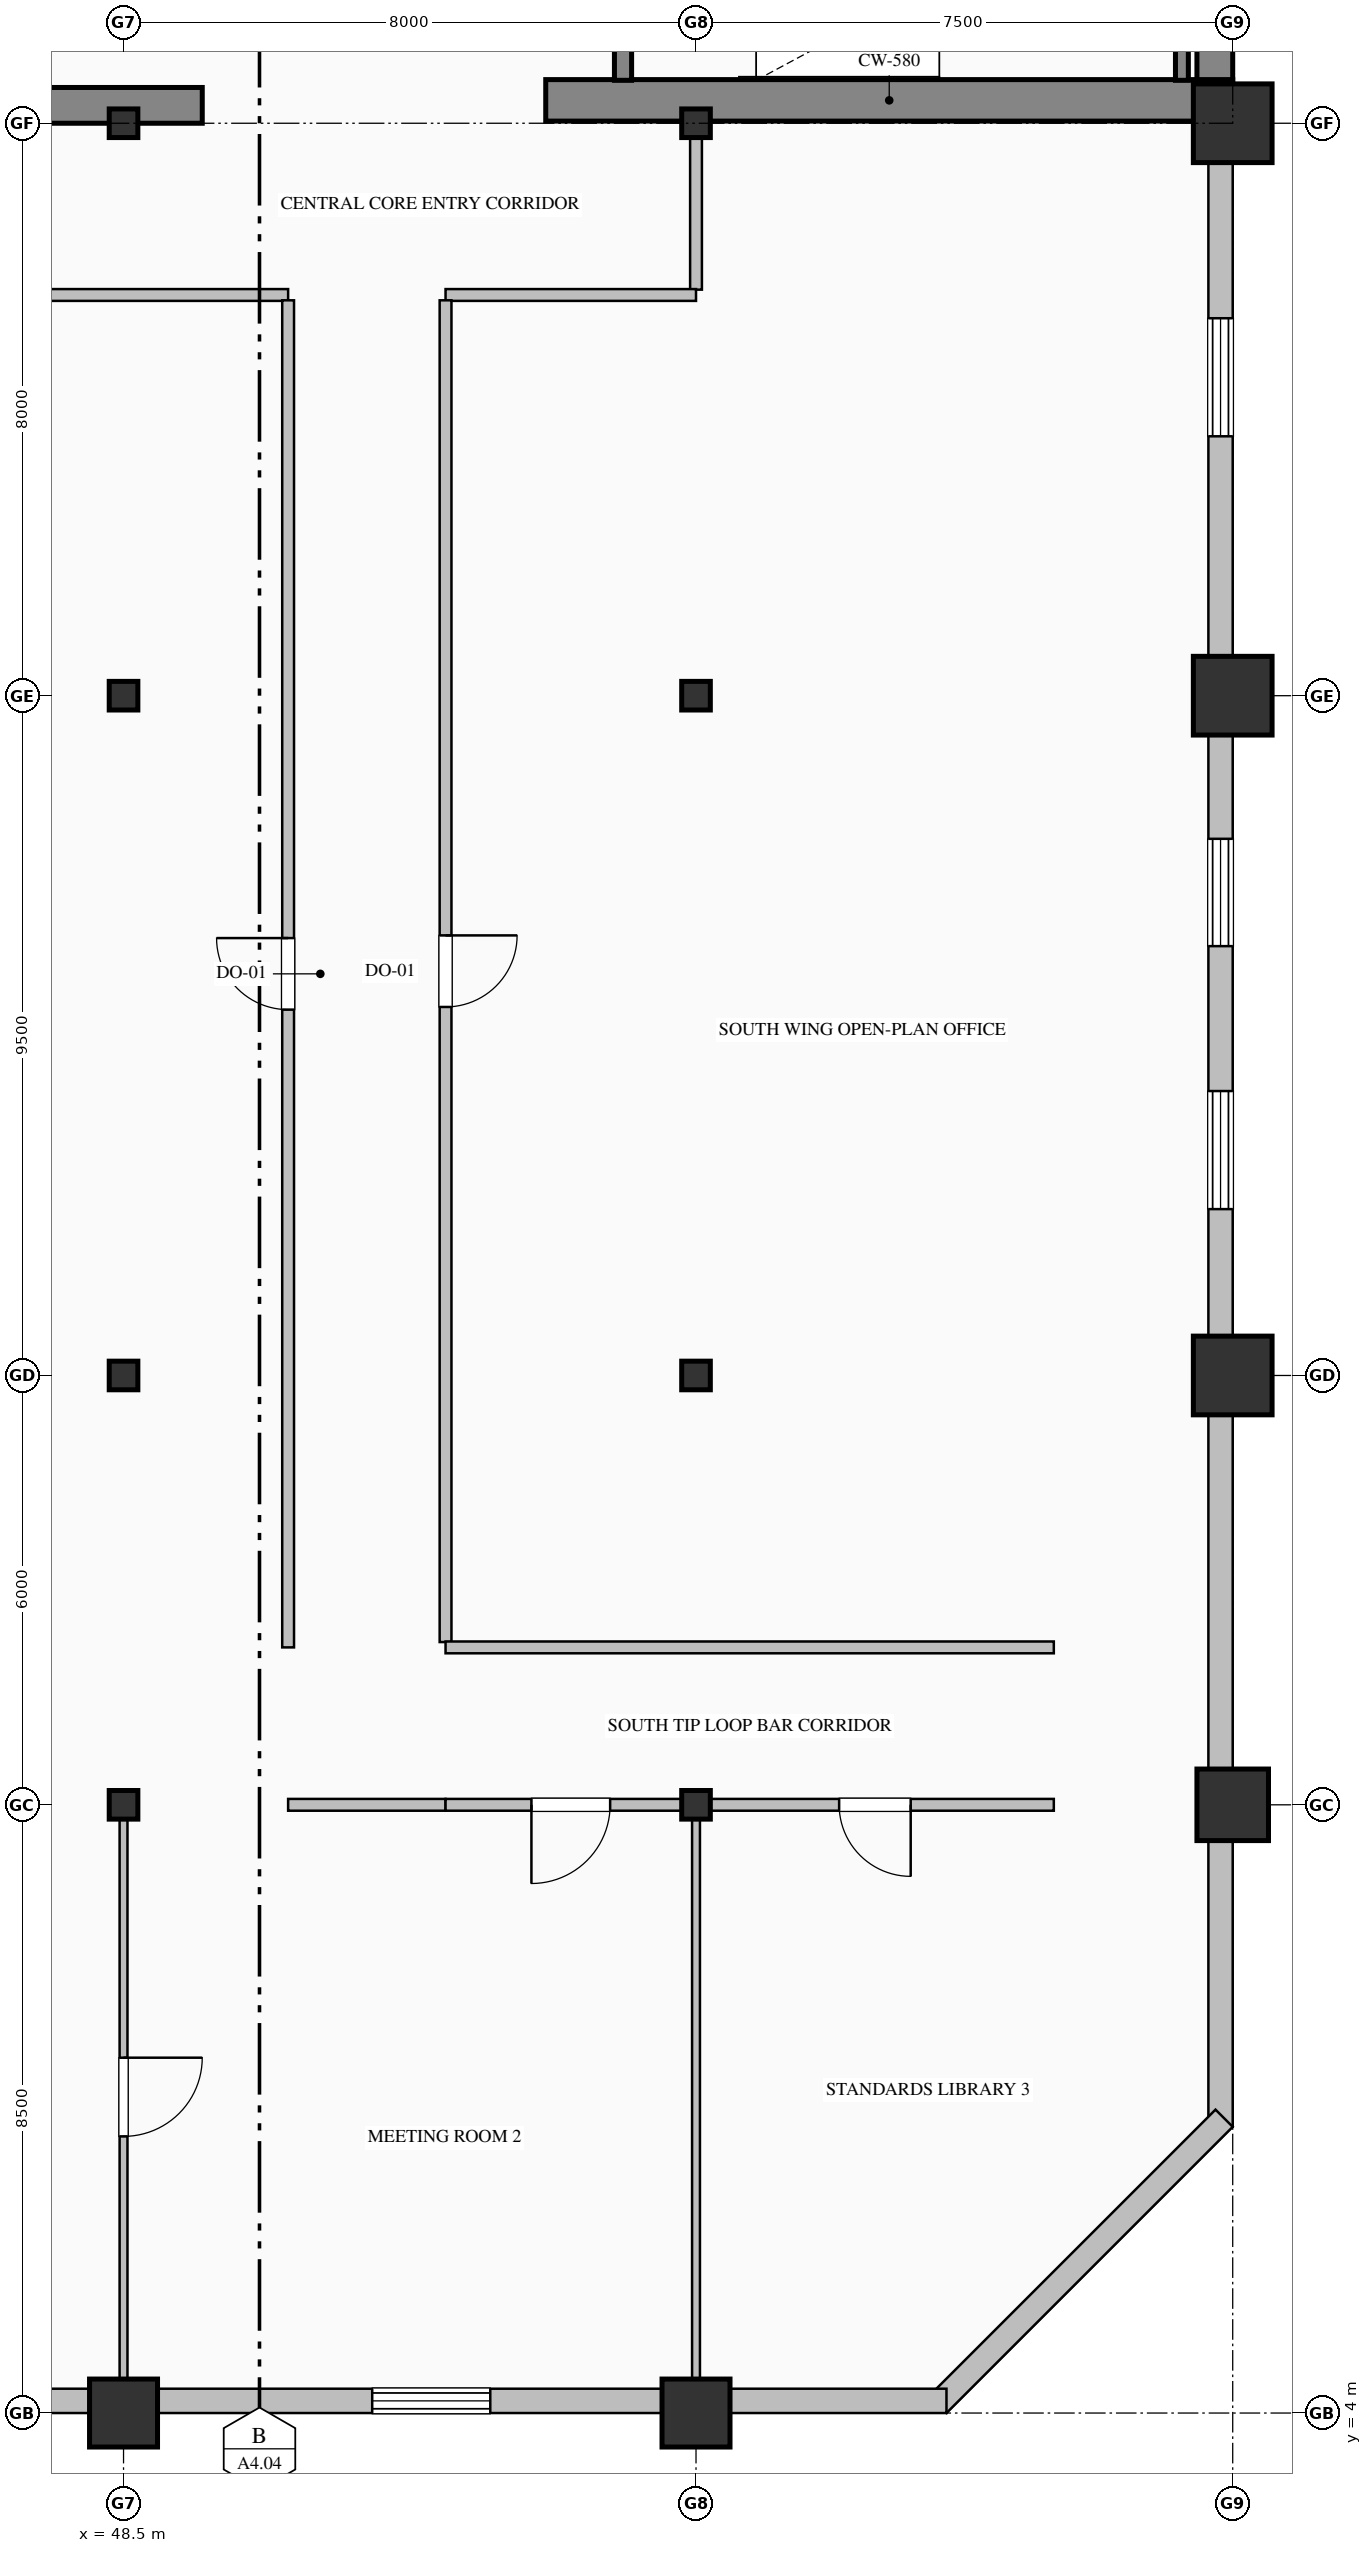
"""IFC4 building model, lengths in metres.
Left out: names, types, materials, properties, quantities, classifications, styles, units other than length and angle.
Written with IfcOpenShell. Run it as: python <this file> out.ifc"""

import sys

from ifc_helpers import new_model, si_unit, direction, frame, frame_2d, origin, origin_2d, place, context, subcontext, project, spatial, rectangle, hollow_rectangle, hollow_circle, i_section, extrude, element, fill, save


model = new_model("IFC4")
c1 = context("Model", 3, precision=1e-05, world=origin(), true_north=direction((0.0, 1.0)))
c2 = subcontext(c1, "Body", "Model", "MODEL_VIEW")
j1 = project(units=[si_unit("LENGTHUNIT", "METRE"), si_unit("PLANEANGLEUNIT", "RADIAN")], contexts=[c1])
p1 = place(None, origin())
s1 = spatial("IfcSite", under=j1, at=p1, CompositionType="ELEMENT")
p2 = place(p1, origin())
s2 = spatial("IfcBuilding", under=s1, at=p2, CompositionType="ELEMENT")
p3 = place(p2, frame((0.0, 0.0, 131.0)))
s3 = spatial("IfcBuildingStorey", under=s2, at=p3, CompositionType="ELEMENT", Elevation=131.0)
p4 = place(p3, frame((63.75, 36.32, 0.0), z_axis=(0.0, 0.0, 1.0), x_axis=(0.0, 1.0, 0.0)))
e1 = element("IfcWall", 1, at=p4, inside=s3, PredefinedType="SHEAR", context=c2, shape_type="SweptSolid", body=[
    extrude(rectangle(XDim=15.18, YDim=0.5, at=frame_2d((7.59, 0.0))), origin(), (0.0, 0.0, 1.0), 3.765),
])
p5 = place(p3, frame((40.5, 36.25, 0.0), z_axis=(0.0, 0.0, 1.0), x_axis=(1.0, 0.0, 0.0)))
e2 = element("IfcWall", 2, at=p5, inside=s3, PredefinedType="SHEAR", context=c2, shape_type="SweptSolid", body=[
    extrude(rectangle(XDim=9.1, YDim=0.5, at=frame_2d((4.55, 0.0))), origin(), (0.0, 0.0, 1.0), 3.765),
])
p6 = place(p3, frame((54.4, 36.32, 0.0), z_axis=(0.0, 0.0, 1.0), x_axis=(1.0, 0.0, 0.0)))
e3 = element("IfcWall", 3, at=p6, inside=s3, PredefinedType="SHEAR", context=c2, shape_type="SweptSolid", body=[
    extrude(rectangle(XDim=9.6, YDim=0.58, at=frame_2d((4.8, 0.0))), origin(), (0.0, 0.0, 1.0), 4.0),
])
p7 = place(p3, frame((48.5, 4.0, 0.0), z_axis=(0.0, 0.0, 1.0), x_axis=(1.0, 0.0, 0.0)))
e4 = element("IfcColumn", 4, at=p7, inside=s3, PredefinedType="COLUMN", context=c2, shape_type="SweptSolid", body=[
    extrude(hollow_rectangle(XDim=0.95, YDim=0.95, WallThickness=0.036, at=origin_2d()), origin(), (0.0, 0.0, 1.0), 4.0),
])
for number, where, z_axis, x_axis in (
    (5, (48.5, 12.5, 0.0), (0.0, 0.0, 1.0), (1.0, 0.0, 0.0)),
    (6, (48.5, 18.5, 0.0), (0.0, 0.0, 1.0), (1.0, 0.0, 0.0)),
    (7, (48.5, 28.0, 0.0), (0.0, 0.0, 1.0), (1.0, 0.0, 0.0)),
    (8, (48.5, 36.0, 0.0), (0.0, 0.0, 1.0), (1.0, 0.0, 0.0)),
):
    element("IfcColumn", number, at=place(p3, frame(where, z_axis=z_axis, x_axis=x_axis)), inside=s3, PredefinedType="COLUMN", context=c2, shape_type="SweptSolid", body=[
        extrude(i_section(OverallWidth=0.4, OverallDepth=0.4, WebThickness=0.013, FlangeThickness=0.021, FilletRadius=0.022, at=origin_2d()), origin(), (0.0, 0.0, 1.0), 4.0),
    ])
p8 = place(p3, frame((56.5, 4.0, 0.0), z_axis=(0.0, 0.0, 1.0), x_axis=(1.0, 0.0, 0.0)))
e9 = element("IfcColumn", 9, at=p8, inside=s3, PredefinedType="COLUMN", context=c2, shape_type="SweptSolid", body=[
    extrude(hollow_rectangle(XDim=0.95, YDim=0.95, WallThickness=0.036, at=origin_2d()), origin(), (0.0, 0.0, 1.0), 4.0),
])
for number, where, z_axis, x_axis in (
    (10, (56.5, 12.5, 0.0), (0.0, 0.0, 1.0), (1.0, 0.0, 0.0)),
    (11, (56.5, 18.5, 0.0), (0.0, 0.0, 1.0), (1.0, 0.0, 0.0)),
    (12, (56.5, 28.0, 0.0), (0.0, 0.0, 1.0), (1.0, 0.0, 0.0)),
    (13, (56.5, 36.0, 0.0), (0.0, 0.0, 1.0), (1.0, 0.0, 0.0)),
):
    element("IfcColumn", number, at=place(p3, frame(where, z_axis=z_axis, x_axis=x_axis)), inside=s3, PredefinedType="COLUMN", context=c2, shape_type="SweptSolid", body=[
        extrude(i_section(OverallWidth=0.4, OverallDepth=0.4, WebThickness=0.013, FlangeThickness=0.021, FilletRadius=0.022, at=origin_2d()), origin(), (0.0, 0.0, 1.0), 4.0),
    ])
p9 = place(p3, frame((64.0, 12.5, 0.0), z_axis=(0.0, 0.0, 1.0), x_axis=(1.0, 0.0, 0.0)))
e14 = element("IfcColumn", 14, at=p9, inside=s3, PredefinedType="COLUMN", context=c2, shape_type="SweptSolid", body=[
    extrude(hollow_circle(Radius=0.5, WallThickness=0.036, at=origin_2d()), origin(), (0.0, 0.0, 1.0), 4.0),
])
for number, where, z_axis, x_axis in (
    (15, (64.0, 18.5, 0.0), (0.0, 0.0, 1.0), (1.0, 0.0, 0.0)),
    (16, (64.0, 28.0, 0.0), (0.0, 0.0, 1.0), (1.0, 0.0, 0.0)),
    (17, (64.0, 36.0, 0.0), (0.0, 0.0, 1.0), (1.0, 0.0, 0.0)),
):
    element("IfcColumn", number, at=place(p3, frame(where, z_axis=z_axis, x_axis=x_axis)), inside=s3, PredefinedType="COLUMN", context=c2, shape_type="SweptSolid", body=[
        extrude(hollow_rectangle(XDim=1.1, YDim=1.1, WallThickness=0.04, at=origin_2d()), origin(), (0.0, 0.0, 1.0), 4.0),
    ])
p10 = place(p3, frame((63.83, 36.05, 0.0), z_axis=(0.0, 0.0, 1.0), x_axis=(0.0, -1.0, 0.0)))
e18 = element("IfcWall", 18, at=p10, inside=s3, PredefinedType="SOLIDWALL", context=c2, shape_type="SweptSolid", body=[
    extrude(rectangle(XDim=28.05, YDim=0.34, at=frame_2d((14.025, 0.0))), origin(), (0.0, 0.0, 1.0), 3.265),
])
p11 = place(p10, frame((2.775, 0.0, 0.85)))
e19 = element("IfcOpeningElement", 19, at=p11, cuts=e18, PredefinedType="OPENING", context=c2, shape_type="SweptSolid", body=[
    extrude(rectangle(XDim=1.65, YDim=1.95, at=frame_2d((0.825, 0.975))), frame((0.0, 0.18, 0.0), z_axis=(0.0, -1.0, 0.0), x_axis=(1.0, 0.0, 0.0)), (0.0, 0.0, 1.0), 0.36),
])
p12 = place(p10, frame((10.05, 0.0, 0.85)))
e20 = element("IfcOpeningElement", 20, at=p12, cuts=e18, PredefinedType="OPENING", context=c2, shape_type="SweptSolid", body=[
    extrude(rectangle(XDim=1.5, YDim=1.95, at=frame_2d((0.75, 0.975))), frame((0.0, 0.18, 0.0), z_axis=(0.0, -1.0, 0.0), x_axis=(1.0, 0.0, 0.0)), (0.0, 0.0, 1.0), 0.36),
])
p13 = place(p10, frame((13.575, 0.0, 0.85)))
e21 = element("IfcOpeningElement", 21, at=p13, cuts=e18, PredefinedType="OPENING", context=c2, shape_type="SweptSolid", body=[
    extrude(rectangle(XDim=1.65, YDim=1.95, at=frame_2d((0.825, 0.975))), frame((0.0, 0.18, 0.0), z_axis=(0.0, -1.0, 0.0), x_axis=(1.0, 0.0, 0.0)), (0.0, 0.0, 1.0), 0.36),
])
p14 = place(p3, frame((63.88, 8.12, 0.0), z_axis=(0.0, 0.0, 1.0), x_axis=(-0.707106781187, -0.707106781187, 0.0)))
e22 = element("IfcWall", 22, at=p14, inside=s3, PredefinedType="SOLIDWALL", context=c2, shape_type="SweptSolid", body=[
    extrude(rectangle(XDim=5.657, YDim=0.34, at=frame_2d((2.828, 0.0))), origin(), (0.0, 0.0, 1.0), 3.765),
])
p15 = place(p3, frame((60.0, 4.17, 0.0), z_axis=(0.0, 0.0, 1.0), x_axis=(-1.0, 0.0, 0.0)))
e23 = element("IfcWall", 23, at=p15, inside=s3, PredefinedType="SOLIDWALL", context=c2, shape_type="SweptSolid", body=[
    extrude(rectangle(XDim=15.5, YDim=0.34, at=frame_2d((7.75, 0.0))), origin(), (0.0, 0.0, 1.0), 3.265),
])
p16 = place(p15, frame((6.375, 0.0, 0.85)))
e24 = element("IfcOpeningElement", 24, at=p16, cuts=e23, PredefinedType="OPENING", context=c2, shape_type="SweptSolid", body=[
    extrude(rectangle(XDim=1.65, YDim=1.95, at=frame_2d((0.825, 0.975))), frame((0.0, 0.18, 0.0), z_axis=(0.0, -1.0, 0.0), x_axis=(1.0, 0.0, 0.0)), (0.0, 0.0, 1.0), 0.36),
])
p17 = place(p3, frame((55.48, 39.75, 0.0), z_axis=(0.0, 0.0, 1.0), x_axis=(0.0, -1.0, 0.0)))
e25 = element("IfcWall", 25, at=p17, inside=s3, PredefinedType="SOLIDWALL", context=c2, shape_type="SweptSolid", body=[
    extrude(rectangle(XDim=3.15, YDim=0.24, at=frame_2d((1.575, 0.0))), origin(), (0.0, 0.0, 1.0), 4.0),
])
p18 = place(p17, frame((1.0, 0.0, 0.0)))
e26 = element("IfcOpeningElement", 26, at=p18, cuts=e25, PredefinedType="OPENING", context=c2, shape_type="SweptSolid", body=[
    extrude(rectangle(XDim=1.15, YDim=2.2, at=frame_2d((0.575, 1.1))), frame((0.0, 0.13, 0.0), z_axis=(0.0, -1.0, 0.0), x_axis=(1.0, 0.0, 0.0)), (0.0, 0.0, 1.0), 0.26),
])
p19 = place(p3, frame((63.29, 36.6, 0.0), z_axis=(0.0, 0.0, 1.0), x_axis=(0.0, 1.0, 0.0)))
e27 = element("IfcWall", 27, at=p19, inside=s3, PredefinedType="SOLIDWALL", context=c2, shape_type="SweptSolid", body=[
    extrude(rectangle(XDim=3.15, YDim=0.18, at=frame_2d((1.575, 0.0))), origin(), (0.0, 0.0, 1.0), 4.0),
])
p20 = place(p3, frame((56.5, 36.0, 0.0), z_axis=(0.0, 0.0, 1.0), x_axis=(0.0, -1.0, 0.0)))
e28 = element("IfcWall", 28, at=p20, inside=s3, PredefinedType="PARTITIONING", context=c2, shape_type="SweptSolid", body=[
    extrude(rectangle(XDim=2.325, YDim=0.165, at=frame_2d((1.163, 0.0))), origin(), (0.0, 0.0, 1.0), 3.157),
])
p21 = place(p3, frame((56.5, 33.6, 0.0), z_axis=(0.0, 0.0, 1.0), x_axis=(-1.0, 0.0, 0.0)))
e29 = element("IfcWall", 29, at=p21, inside=s3, PredefinedType="PARTITIONING", context=c2, shape_type="SweptSolid", body=[
    extrude(rectangle(XDim=3.5, YDim=0.165, at=frame_2d((1.75, 0.0))), origin(), (0.0, 0.0, 1.0), 3.765),
])
p22 = place(p3, frame((50.8, 33.6, 0.0), z_axis=(0.0, 0.0, 1.0), x_axis=(-1.0, 0.0, 0.0)))
e30 = element("IfcWall", 30, at=p22, inside=s3, PredefinedType="PARTITIONING", context=c2, shape_type="SweptSolid", body=[
    extrude(rectangle(XDim=10.3, YDim=0.165, at=frame_2d((5.15, 0.0))), origin(), (0.0, 0.0, 1.0), 3.765),
])
p23 = place(p3, frame((53.0, 33.525, 0.0), z_axis=(0.0, 0.0, 1.0), x_axis=(0.0, -1.0, 0.0)))
e31 = element("IfcWall", 31, at=p23, inside=s3, PredefinedType="PARTITIONING", context=c2, shape_type="SweptSolid", body=[
    extrude(rectangle(XDim=18.751, YDim=0.165, at=frame_2d((9.375, 0.0))), origin(), (0.0, 0.0, 1.0), 3.765),
])
p24 = place(p23, frame((8.875, 0.0, 0.0)))
e32 = element("IfcOpeningElement", 32, at=p24, cuts=e31, PredefinedType="OPENING", context=c2, shape_type="SweptSolid", body=[
    extrude(rectangle(XDim=1.0, YDim=2.15, at=frame_2d((0.5, 1.075))), frame((0.0, 0.093, 0.0), z_axis=(0.0, -1.0, 0.0), x_axis=(1.0, 0.0, 0.0)), (0.0, 0.0, 1.0), 0.185),
])
p25 = place(p3, frame((50.8, 14.7, 0.0), z_axis=(0.0, 0.0, 1.0), x_axis=(0.0, 1.0, 0.0)))
e33 = element("IfcWall", 33, at=p25, inside=s3, PredefinedType="PARTITIONING", context=c2, shape_type="SweptSolid", body=[
    extrude(rectangle(XDim=18.825, YDim=0.165, at=frame_2d((9.413, 0.0))), origin(), (0.0, 0.0, 1.0), 3.765),
])
p26 = place(p25, frame((8.913, 0.0, 0.0)))
e34 = element("IfcOpeningElement", 34, at=p26, cuts=e33, PredefinedType="OPENING", context=c2, shape_type="SweptSolid", body=[
    extrude(rectangle(XDim=1.0, YDim=2.15, at=frame_2d((0.5, 1.075))), frame((0.0, 0.093, 0.0), z_axis=(0.0, -1.0, 0.0), x_axis=(1.0, 0.0, 0.0)), (0.0, 0.0, 1.0), 0.185),
])
p27 = place(p3, frame((53.0, 12.5, 0.0), z_axis=(0.0, 0.0, 1.0), x_axis=(-1.0, 0.0, 0.0)))
e35 = element("IfcWall", 35, at=p27, inside=s3, PredefinedType="PARTITIONING", context=c2, shape_type="SweptSolid", body=[
    extrude(rectangle(XDim=2.2, YDim=0.165, at=frame_2d((1.1, 0.0))), origin(), (0.0, 0.0, 1.0), 3.157),
])
p28 = place(p3, frame((53.0, 14.7, 0.0), z_axis=(0.0, 0.0, 1.0), x_axis=(1.0, 0.0, 0.0)))
e36 = element("IfcWall", 36, at=p28, inside=s3, PredefinedType="PARTITIONING", context=c2, shape_type="SweptSolid", body=[
    extrude(rectangle(XDim=8.5, YDim=0.165, at=frame_2d((4.25, 0.0))), origin(), (0.0, 0.0, 1.0), 3.765),
])
p29 = place(p3, frame((56.5, 12.5, 0.0), z_axis=(0.0, 0.0, 1.0), x_axis=(-1.0, 0.0, 0.0)))
e37 = element("IfcWall", 37, at=p29, inside=s3, PredefinedType="PARTITIONING", context=c2, shape_type="SweptSolid", body=[
    extrude(rectangle(XDim=3.5, YDim=0.165, at=frame_2d((1.75, 0.0))), origin(), (0.0, 0.0, 1.0), 3.157),
])
p30 = place(p29, frame((1.2, 0.0, 0.0)))
e38 = element("IfcOpeningElement", 38, at=p30, cuts=e37, PredefinedType="OPENING", context=c2, shape_type="SweptSolid", body=[
    extrude(rectangle(XDim=1.1, YDim=2.2, at=frame_2d((0.55, 1.1))), frame((0.0, 0.093, 0.0), z_axis=(0.0, -1.0, 0.0), x_axis=(1.0, 0.0, 0.0)), (0.0, 0.0, 1.0), 0.185),
])
p31 = place(p3, frame((61.5, 12.5, 0.0), z_axis=(0.0, 0.0, 1.0), x_axis=(-1.0, 0.0, 0.0)))
e39 = element("IfcWall", 39, at=p31, inside=s3, PredefinedType="PARTITIONING", context=c2, shape_type="SweptSolid", body=[
    extrude(rectangle(XDim=5.0, YDim=0.165, at=frame_2d((2.5, 0.0))), origin(), (0.0, 0.0, 1.0), 3.157),
])
p32 = place(p31, frame((2.0, 0.0, 0.0)))
e40 = element("IfcOpeningElement", 40, at=p32, cuts=e39, PredefinedType="OPENING", context=c2, shape_type="SweptSolid", body=[
    extrude(rectangle(XDim=1.0, YDim=2.15, at=frame_2d((0.5, 1.075))), frame((0.0, 0.093, 0.0), z_axis=(0.0, -1.0, 0.0), x_axis=(1.0, 0.0, 0.0)), (0.0, 0.0, 1.0), 0.185),
])
p33 = place(p3, frame((48.5, 12.5, 0.0), z_axis=(0.0, 0.0, 1.0), x_axis=(0.0, -1.0, 0.0)))
e41 = element("IfcWall", 41, at=p33, inside=s3, PredefinedType="MOVABLE", context=c2, shape_type="SweptSolid", body=[
    extrude(rectangle(XDim=8.168, YDim=0.11, at=frame_2d((4.084, 0.0))), origin(), (0.0, 0.0, 1.0), 3.157),
])
p34 = place(p33, frame((3.534, 0.0, 0.0)))
e42 = element("IfcOpeningElement", 42, at=p34, cuts=e41, PredefinedType="OPENING", context=c2, shape_type="SweptSolid", body=[
    extrude(rectangle(XDim=1.1, YDim=2.2, at=frame_2d((0.55, 1.1))), frame((0.0, 0.065, 0.0), z_axis=(0.0, -1.0, 0.0), x_axis=(1.0, 0.0, 0.0)), (0.0, 0.0, 1.0), 0.13),
])
p35 = place(p3, frame((56.5, 12.426, 0.0), z_axis=(0.0, 0.0, 1.0), x_axis=(0.0, -1.0, 0.0)))
e43 = element("IfcWall", 43, at=p35, inside=s3, PredefinedType="MOVABLE", context=c2, shape_type="SweptSolid", body=[
    extrude(rectangle(XDim=8.094, YDim=0.11, at=frame_2d((4.047, 0.0))), origin(), (0.0, 0.0, 1.0), 3.157),
])
p36 = place(p11, origin())
e44 = element("IfcWindow", 44, at=p36, inside=s3, PartitioningType="DOUBLE_PANEL_VERTICAL", PredefinedType="WINDOW", context=c2, shape_type="SweptSolid", body=[
    extrude(rectangle(XDim=1.65, YDim=1.95, at=frame_2d((0.825, 0.975))), frame((0.0, 0.15, 0.0), z_axis=(0.0, -1.0, 0.0), x_axis=(1.0, 0.0, 0.0)), (0.0, 0.0, 1.0), 0.06),
])
fill(e19, e44)
p37 = place(p12, origin())
e45 = element("IfcWindow", 45, at=p37, inside=s3, PartitioningType="DOUBLE_PANEL_VERTICAL", PredefinedType="WINDOW", context=c2, shape_type="SweptSolid", body=[
    extrude(rectangle(XDim=1.5, YDim=1.95, at=frame_2d((0.75, 0.975))), frame((0.0, 0.15, 0.0), z_axis=(0.0, -1.0, 0.0), x_axis=(1.0, 0.0, 0.0)), (0.0, 0.0, 1.0), 0.06),
])
fill(e20, e45)
p38 = place(p13, origin())
e46 = element("IfcWindow", 46, at=p38, inside=s3, PartitioningType="DOUBLE_PANEL_VERTICAL", PredefinedType="WINDOW", context=c2, shape_type="SweptSolid", body=[
    extrude(rectangle(XDim=1.65, YDim=1.95, at=frame_2d((0.825, 0.975))), frame((0.0, 0.15, 0.0), z_axis=(0.0, -1.0, 0.0), x_axis=(1.0, 0.0, 0.0)), (0.0, 0.0, 1.0), 0.06),
])
fill(e21, e46)
p39 = place(p16, origin())
e47 = element("IfcWindow", 47, at=p39, inside=s3, PartitioningType="DOUBLE_PANEL_VERTICAL", PredefinedType="WINDOW", context=c2, shape_type="SweptSolid", body=[
    extrude(rectangle(XDim=1.65, YDim=1.95, at=frame_2d((0.825, 0.975))), frame((0.0, 0.15, 0.0), z_axis=(0.0, -1.0, 0.0), x_axis=(1.0, 0.0, 0.0)), (0.0, 0.0, 1.0), 0.06),
])
fill(e24, e47)
p40 = place(p24, origin())
e48 = element("IfcDoor", 48, at=p40, inside=s3, OperationType="SINGLE_SWING_LEFT", PredefinedType="DOOR", context=c2, shape_type="SweptSolid", body=[
    extrude(rectangle(XDim=1.0, YDim=2.15, at=frame_2d((0.5, 1.075))), frame((0.0, 0.025, 0.0), z_axis=(0.0, -1.0, 0.0), x_axis=(1.0, 0.0, 0.0)), (0.0, 0.0, 1.0), 0.05),
])
fill(e32, e48)
p41 = place(p26, origin())
e49 = element("IfcDoor", 49, at=p41, inside=s3, OperationType="SINGLE_SWING_RIGHT", PredefinedType="DOOR", context=c2, shape_type="SweptSolid", body=[
    extrude(rectangle(XDim=1.0, YDim=2.15, at=frame_2d((0.5, 1.075))), frame((0.0, 0.025, 0.0), z_axis=(0.0, -1.0, 0.0), x_axis=(1.0, 0.0, 0.0)), (0.0, 0.0, 1.0), 0.05),
])
fill(e34, e49)
p42 = place(p34, origin())
e50 = element("IfcDoor", 50, at=p42, inside=s3, OperationType="SINGLE_SWING_LEFT", PredefinedType="DOOR", context=c2, shape_type="SweptSolid", body=[
    extrude(rectangle(XDim=1.1, YDim=2.2, at=frame_2d((0.55, 1.1))), frame((0.0, 0.025, 0.0), z_axis=(0.0, -1.0, 0.0), x_axis=(1.0, 0.0, 0.0)), (0.0, 0.0, 1.0), 0.05),
])
fill(e42, e50)
p43 = place(p30, origin())
e51 = element("IfcDoor", 51, at=p43, inside=s3, OperationType="SINGLE_SWING_RIGHT", PredefinedType="DOOR", context=c2, shape_type="SweptSolid", body=[
    extrude(rectangle(XDim=1.1, YDim=2.2, at=frame_2d((0.55, 1.1))), frame((0.0, 0.025, 0.0), z_axis=(0.0, -1.0, 0.0), x_axis=(1.0, 0.0, 0.0)), (0.0, 0.0, 1.0), 0.05),
])
fill(e38, e51)
p44 = place(p32, origin())
e52 = element("IfcDoor", 52, at=p44, inside=s3, OperationType="SINGLE_SWING_LEFT", PredefinedType="DOOR", context=c2, shape_type="SweptSolid", body=[
    extrude(rectangle(XDim=1.0, YDim=2.15, at=frame_2d((0.5, 1.075))), frame((0.0, 0.025, 0.0), z_axis=(0.0, -1.0, 0.0), x_axis=(1.0, 0.0, 0.0)), (0.0, 0.0, 1.0), 0.05),
])
fill(e40, e52)
save(model, sys.argv[1])
